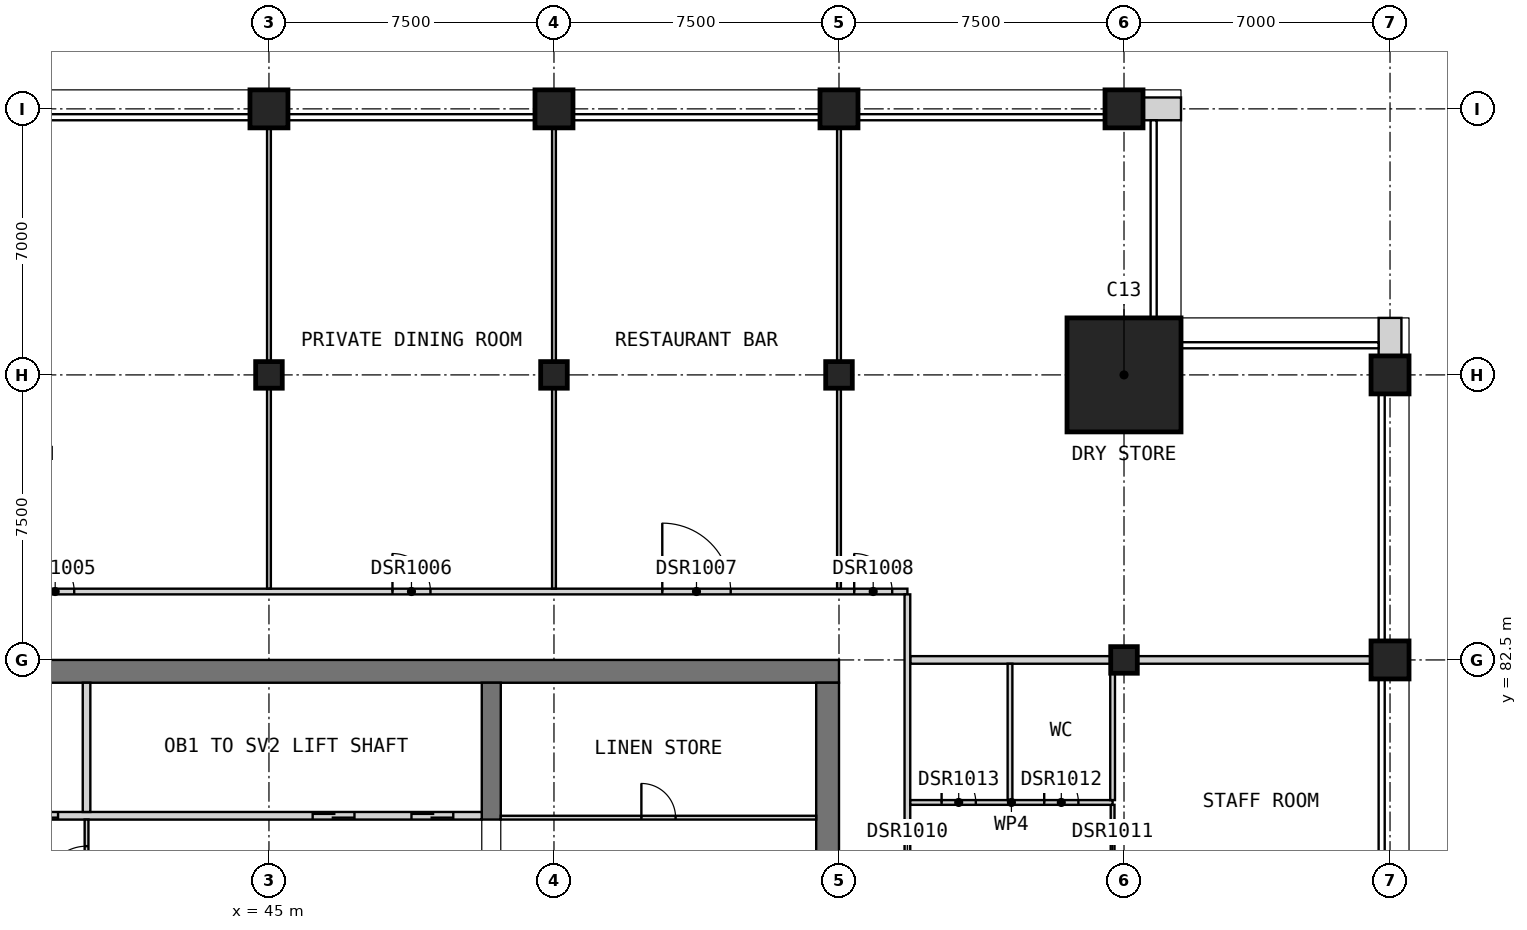
"""IFC4 building model, lengths in metres.
Left out: names, types, materials, properties, quantities, classifications, styles, units other than length and angle.
Written with IfcOpenShell. Run it as: python <this file> out.ifc"""

import sys

from ifc_helpers import new_model, si_unit, direction, frame, frame_2d, origin, origin_2d, place, context, subcontext, project, spatial, rectangle, extrude, element, fill, save


model = new_model("IFC4")
c1 = context("Model", 3, precision=1e-05, world=origin(), true_north=direction((0.0, 1.0)))
c2 = subcontext(c1, "Body", "Model", "MODEL_VIEW")
j1 = project(units=[si_unit("LENGTHUNIT", "METRE"), si_unit("PLANEANGLEUNIT", "RADIAN")], contexts=[c1])
p1 = place(None, origin())
s1 = spatial("IfcSite", under=j1, at=p1, CompositionType="ELEMENT")
p2 = place(p1, origin())
s2 = spatial("IfcBuilding", under=s1, at=p2, CompositionType="ELEMENT")
p3 = place(p2, frame((0.0, 0.0, 292.2)))
s3 = spatial("IfcBuildingStorey", under=s2, at=p3, CompositionType="ELEMENT", Elevation=292.2)
p4 = place(p3, frame((45.0, 90.0, 0.0), z_axis=(0.0, 0.0, 1.0), x_axis=(1.0, 0.0, 0.0)))
e1 = element("IfcColumn", 1, at=p4, inside=s3, PredefinedType="COLUMN", context=c2, shape_type="SweptSolid", body=[
    extrude(rectangle(XDim=0.7, YDim=0.7, at=origin_2d()), origin(), (0.0, 0.0, 1.0), 5.5),
])
p5 = place(p3, frame((45.0, 97.0, 0.0), z_axis=(0.0, 0.0, 1.0), x_axis=(1.0, 0.0, 0.0)))
e2 = element("IfcColumn", 2, at=p5, inside=s3, PredefinedType="COLUMN", context=c2, shape_type="SweptSolid", body=[
    extrude(rectangle(XDim=1.0, YDim=1.0, at=origin_2d()), origin(), (0.0, 0.0, 1.0), 5.5),
])
p6 = place(p3, frame((52.5, 90.0, 0.0), z_axis=(0.0, 0.0, 1.0), x_axis=(1.0, 0.0, 0.0)))
e3 = element("IfcColumn", 3, at=p6, inside=s3, PredefinedType="COLUMN", context=c2, shape_type="SweptSolid", body=[
    extrude(rectangle(XDim=0.7, YDim=0.7, at=origin_2d()), origin(), (0.0, 0.0, 1.0), 5.5),
])
p7 = place(p3, frame((52.5, 97.0, 0.0), z_axis=(0.0, 0.0, 1.0), x_axis=(1.0, 0.0, 0.0)))
e4 = element("IfcColumn", 4, at=p7, inside=s3, PredefinedType="COLUMN", context=c2, shape_type="SweptSolid", body=[
    extrude(rectangle(XDim=1.0, YDim=1.0, at=origin_2d()), origin(), (0.0, 0.0, 1.0), 5.5),
])
p8 = place(p3, frame((60.0, 90.0, 0.0), z_axis=(0.0, 0.0, 1.0), x_axis=(1.0, 0.0, 0.0)))
e5 = element("IfcColumn", 5, at=p8, inside=s3, PredefinedType="COLUMN", context=c2, shape_type="SweptSolid", body=[
    extrude(rectangle(XDim=0.7, YDim=0.7, at=origin_2d()), origin(), (0.0, 0.0, 1.0), 5.5),
])
p9 = place(p3, frame((60.0, 97.0, 0.0), z_axis=(0.0, 0.0, 1.0), x_axis=(1.0, 0.0, 0.0)))
e6 = element("IfcColumn", 6, at=p9, inside=s3, PredefinedType="COLUMN", context=c2, shape_type="SweptSolid", body=[
    extrude(rectangle(XDim=1.0, YDim=1.0, at=origin_2d()), origin(), (0.0, 0.0, 1.0), 5.5),
])
p10 = place(p3, frame((67.5, 82.5, 0.0), z_axis=(0.0, 0.0, 1.0), x_axis=(1.0, 0.0, 0.0)))
e7 = element("IfcColumn", 7, at=p10, inside=s3, PredefinedType="COLUMN", context=c2, shape_type="SweptSolid", body=[
    extrude(rectangle(XDim=0.7, YDim=0.7, at=origin_2d()), origin(), (0.0, 0.0, 1.0), 5.5),
])
for number, where, z_axis, x_axis in (
    (8, (67.5, 97.0, 0.0), (0.0, 0.0, 1.0), (1.0, 0.0, 0.0)),
    (9, (74.5, 82.5, 0.0), (0.0, 0.0, 1.0), (1.0, 0.0, 0.0)),
    (10, (74.5, 90.0, 0.0), (0.0, 0.0, 1.0), (1.0, 0.0, 0.0)),
):
    element("IfcColumn", number, at=place(p3, frame(where, z_axis=z_axis, x_axis=x_axis)), inside=s3, PredefinedType="COLUMN", context=c2, shape_type="SweptSolid", body=[
        extrude(rectangle(XDim=1.0, YDim=1.0, at=origin_2d()), origin(), (0.0, 0.0, 1.0), 5.5),
    ])
p11 = place(p3, frame((67.5, 90.0, 0.0), z_axis=(0.0, 0.0, 1.0), x_axis=(1.0, 0.0, 0.0)))
e11 = element("IfcColumn", 11, at=p11, inside=s3, PredefinedType="COLUMN", context=c2, shape_type="SweptSolid", body=[
    extrude(rectangle(XDim=3.0, YDim=3.0, at=origin_2d()), origin(), (0.0, 0.0, 1.0), 5.5),
])
p12 = place(p3, frame((30.0, 82.2, 0.0), z_axis=(0.0, 0.0, 1.0), x_axis=(1.0, 0.0, 0.0)))
e12 = element("IfcWall", 12, at=p12, inside=s3, PredefinedType="SHEAR", context=c2, shape_type="SweptSolid", body=[
    extrude(rectangle(XDim=30.0, YDim=0.6, at=frame_2d((15.0, 0.0))), origin(), (0.0, 0.0, 1.0), 5.5),
])
p13 = place(p3, frame((59.7, 60.6, 0.0), z_axis=(0.0, 0.0, 1.0), x_axis=(0.0, 1.0, 0.0)))
e13 = element("IfcWall", 13, at=p13, inside=s3, PredefinedType="SHEAR", context=c2, shape_type="SweptSolid", body=[
    extrude(rectangle(XDim=21.3, YDim=0.6, at=frame_2d((10.65, 0.0))), origin(), (0.0, 0.0, 1.0), 5.5),
])
p14 = place(p13, frame((14.9, 0.0, 0.0)))
e14 = element("IfcOpeningElement", 14, at=p14, cuts=e13, PredefinedType="OPENING", context=c2, shape_type="SweptSolid", body=[
    extrude(rectangle(XDim=1.8, YDim=2.1, at=frame_2d((0.9, 1.05))), frame((0.0, 0.31, 0.0), z_axis=(0.0, -1.0, 0.0), x_axis=(1.0, 0.0, 0.0)), (0.0, 0.0, 1.0), 0.62),
])
p15 = place(p3, frame((50.85, 78.3, 0.0), z_axis=(0.0, 0.0, 1.0), x_axis=(0.0, 1.0, 0.0)))
e15 = element("IfcWall", 15, at=p15, inside=s3, PredefinedType="SHEAR", context=c2, shape_type="SweptSolid", body=[
    extrude(rectangle(XDim=3.6, YDim=0.5, at=frame_2d((1.8, 0.0))), origin(), (0.0, 0.0, 1.0), 5.5),
])
for number, where, z_axis, x_axis in (
    (16, (74.5, 90.5, 0.0), (0.0, 0.0, 1.0), (0.0, 1.0, 0.0)),
    (17, (69.0, 97.0, 0.0), (0.0, 0.0, 1.0), (-1.0, 0.0, 0.0)),
):
    element("IfcWall", number, at=place(p3, frame(where, z_axis=z_axis, x_axis=x_axis)), inside=s3, PredefinedType="SOLIDWALL", context=c2, shape_type="SweptSolid", body=[
        extrude(rectangle(XDim=1.0, YDim=0.6, at=frame_2d((0.5, 0.0))), origin(), (0.0, 0.0, 1.0), 5.2),
    ])
p16 = place(p3, frame((35.0, 78.4, 0.0), z_axis=(0.0, 0.0, 1.0), x_axis=(1.0, 0.0, 0.0)))
e18 = element("IfcWall", 18, at=p16, inside=s3, PredefinedType="SOLIDWALL", context=c2, shape_type="SweptSolid", body=[
    extrude(rectangle(XDim=15.6, YDim=0.2, at=frame_2d((7.8, 0.0))), origin(), (0.0, 0.0, 1.0), 5.5),
])
p17 = place(p16, frame((0.75, 0.0, 0.0)))
e19 = element("IfcOpeningElement", 19, at=p17, cuts=e18, PredefinedType="OPENING", context=c2, shape_type="SweptSolid", body=[
    extrude(rectangle(XDim=1.1, YDim=2.1, at=frame_2d((0.55, 1.05))), frame((0.0, 0.11, 0.0), z_axis=(0.0, -1.0, 0.0), x_axis=(1.0, 0.0, 0.0)), (0.0, 0.0, 1.0), 0.22),
])
p18 = place(p16, frame((3.35, 0.0, 0.0)))
e20 = element("IfcOpeningElement", 20, at=p18, cuts=e18, PredefinedType="OPENING", context=c2, shape_type="SweptSolid", body=[
    extrude(rectangle(XDim=1.1, YDim=2.1, at=frame_2d((0.55, 1.05))), frame((0.0, 0.11, 0.0), z_axis=(0.0, -1.0, 0.0), x_axis=(1.0, 0.0, 0.0)), (0.0, 0.0, 1.0), 0.22),
])
p19 = place(p16, frame((11.15, 0.0, 0.0)))
e21 = element("IfcOpeningElement", 21, at=p19, cuts=e18, PredefinedType="OPENING", context=c2, shape_type="SweptSolid", body=[
    extrude(rectangle(XDim=1.1, YDim=2.1, at=frame_2d((0.55, 1.05))), frame((0.0, 0.11, 0.0), z_axis=(0.0, -1.0, 0.0), x_axis=(1.0, 0.0, 0.0)), (0.0, 0.0, 1.0), 0.22),
])
p20 = place(p16, frame((13.75, 0.0, 0.0)))
e22 = element("IfcOpeningElement", 22, at=p20, cuts=e18, PredefinedType="OPENING", context=c2, shape_type="SweptSolid", body=[
    extrude(rectangle(XDim=1.1, YDim=2.1, at=frame_2d((0.55, 1.05))), frame((0.0, 0.11, 0.0), z_axis=(0.0, -1.0, 0.0), x_axis=(1.0, 0.0, 0.0)), (0.0, 0.0, 1.0), 0.22),
])
p21 = place(p3, frame((40.2, 78.5, 0.0), z_axis=(0.0, 0.0, 1.0), x_axis=(0.0, 1.0, 0.0)))
e23 = element("IfcWall", 23, at=p21, inside=s3, PredefinedType="SOLIDWALL", context=c2, shape_type="SweptSolid", body=[
    extrude(rectangle(XDim=3.4, YDim=0.2, at=frame_2d((1.7, 0.0))), origin(), (0.0, 0.0, 1.0), 5.5),
])
p22 = place(p3, frame((40.2, 75.3, 0.0), z_axis=(0.0, 0.0, 1.0), x_axis=(0.0, 1.0, 0.0)))
e24 = element("IfcWall", 24, at=p22, inside=s3, PredefinedType="PARTITIONING", context=c2, shape_type="SweptSolid", body=[
    extrude(rectangle(XDim=3.0, YDim=0.1, at=frame_2d((1.5, 0.0))), origin(), (0.0, 0.0, 1.0), 5.2),
])
p23 = place(p22, frame((1.2, 0.0, 0.0)))
e25 = element("IfcOpeningElement", 25, at=p23, cuts=e24, PredefinedType="OPENING", context=c2, shape_type="SweptSolid", body=[
    extrude(rectangle(XDim=1.1, YDim=2.1, at=frame_2d((0.55, 1.05))), frame((0.0, 0.06, 0.0), z_axis=(0.0, -1.0, 0.0), x_axis=(1.0, 0.0, 0.0)), (0.0, 0.0, 1.0), 0.12),
])
p24 = place(p3, frame((51.1, 78.35, 0.0), z_axis=(0.0, 0.0, 1.0), x_axis=(1.0, 0.0, 0.0)))
e26 = element("IfcWall", 26, at=p24, inside=s3, PredefinedType="PARTITIONING", context=c2, shape_type="SweptSolid", body=[
    extrude(rectangle(XDim=8.3, YDim=0.1, at=frame_2d((4.15, 0.0))), origin(), (0.0, 0.0, 1.0), 5.2),
])
p25 = place(p24, frame((3.7, 0.0, 0.0)))
e27 = element("IfcOpeningElement", 27, at=p25, cuts=e26, PredefinedType="OPENING", context=c2, shape_type="SweptSolid", body=[
    extrude(rectangle(XDim=0.9, YDim=2.1, at=frame_2d((0.45, 1.05))), frame((0.0, 0.06, 0.0), z_axis=(0.0, -1.0, 0.0), x_axis=(1.0, 0.0, 0.0)), (0.0, 0.0, 1.0), 0.12),
])
p26 = place(p3, frame((61.875, 82.5, 0.0), z_axis=(0.0, 0.0, 1.0), x_axis=(1.0, 0.0, 0.0)))
e28 = element("IfcWall", 28, at=p26, inside=s3, PredefinedType="PARTITIONING", context=c2, shape_type="SweptSolid", body=[
    extrude(rectangle(XDim=13.125, YDim=0.2, at=frame_2d((6.562, 0.0))), origin(), (0.0, 0.0, 1.0), 5.2),
])
p27 = place(p3, frame((33.75, 84.3, 0.0), z_axis=(0.0, 0.0, 1.0), x_axis=(1.0, 0.0, 0.0)))
e29 = element("IfcWall", 29, at=p27, inside=s3, PredefinedType="PARTITIONING", context=c2, shape_type="SweptSolid", body=[
    extrude(rectangle(XDim=28.05, YDim=0.15, at=frame_2d((14.025, 0.0))), origin(), (0.0, 0.0, 1.0), 5.2),
])
p28 = place(p27, frame((5.125, 0.0, 0.0)))
e30 = element("IfcOpeningElement", 30, at=p28, cuts=e29, PredefinedType="OPENING", context=c2, shape_type="SweptSolid", body=[
    extrude(rectangle(XDim=1.0, YDim=2.1, at=frame_2d((0.5, 1.05))), frame((0.0, 0.085, 0.0), z_axis=(0.0, -1.0, 0.0), x_axis=(1.0, 0.0, 0.0)), (0.0, 0.0, 1.0), 0.17),
])
p29 = place(p27, frame((14.5, 0.0, 0.0)))
e31 = element("IfcOpeningElement", 31, at=p29, cuts=e29, PredefinedType="OPENING", context=c2, shape_type="SweptSolid", body=[
    extrude(rectangle(XDim=1.0, YDim=2.1, at=frame_2d((0.5, 1.05))), frame((0.0, 0.085, 0.0), z_axis=(0.0, -1.0, 0.0), x_axis=(1.0, 0.0, 0.0)), (0.0, 0.0, 1.0), 0.17),
])
p30 = place(p27, frame((21.6, 0.0, 0.0)))
e32 = element("IfcOpeningElement", 32, at=p30, cuts=e29, PredefinedType="OPENING", context=c2, shape_type="SweptSolid", body=[
    extrude(rectangle(XDim=1.8, YDim=2.1, at=frame_2d((0.9, 1.05))), frame((0.0, 0.085, 0.0), z_axis=(0.0, -1.0, 0.0), x_axis=(1.0, 0.0, 0.0)), (0.0, 0.0, 1.0), 0.17),
])
p31 = place(p27, frame((26.65, 0.0, 0.0)))
e33 = element("IfcOpeningElement", 33, at=p31, cuts=e29, PredefinedType="OPENING", context=c2, shape_type="SweptSolid", body=[
    extrude(rectangle(XDim=1.0, YDim=2.1, at=frame_2d((0.5, 1.05))), frame((0.0, 0.085, 0.0), z_axis=(0.0, -1.0, 0.0), x_axis=(1.0, 0.0, 0.0)), (0.0, 0.0, 1.0), 0.17),
])
p32 = place(p3, frame((61.8, 58.275, 0.0), z_axis=(0.0, 0.0, 1.0), x_axis=(0.0, 1.0, 0.0)))
e34 = element("IfcWall", 34, at=p32, inside=s3, PredefinedType="PARTITIONING", context=c2, shape_type="SweptSolid", body=[
    extrude(rectangle(XDim=25.95, YDim=0.15, at=frame_2d((12.975, 0.0))), origin(), (0.0, 0.0, 1.0), 5.2),
])
p33 = place(p32, frame((8.725, 0.0, 0.0)))
e35 = element("IfcOpeningElement", 35, at=p33, cuts=e34, PredefinedType="OPENING", context=c2, shape_type="SweptSolid", body=[
    extrude(rectangle(XDim=1.0, YDim=2.1, at=frame_2d((0.5, 1.05))), frame((0.0, 0.085, 0.0), z_axis=(0.0, -1.0, 0.0), x_axis=(1.0, 0.0, 0.0)), (0.0, 0.0, 1.0), 0.17),
])
p34 = place(p32, frame((18.15, 0.0, 0.0)))
e36 = element("IfcOpeningElement", 36, at=p34, cuts=e34, PredefinedType="OPENING", context=c2, shape_type="SweptSolid", body=[
    extrude(rectangle(XDim=0.9, YDim=2.1, at=frame_2d((0.45, 1.05))), frame((0.0, 0.085, 0.0), z_axis=(0.0, -1.0, 0.0), x_axis=(1.0, 0.0, 0.0)), (0.0, 0.0, 1.0), 0.17),
])
for number, where, z_axis, x_axis in (
    (37, (45.0, 84.375, 0.0), (0.0, 0.0, 1.0), (0.0, 1.0, 0.0)),
    (38, (52.5, 84.375, 0.0), (0.0, 0.0, 1.0), (0.0, 1.0, 0.0)),
    (39, (60.0, 84.375, 0.0), (0.0, 0.0, 1.0), (0.0, 1.0, 0.0)),
):
    element("IfcWall", number, at=place(p3, frame(where, z_axis=z_axis, x_axis=x_axis)), inside=s3, PredefinedType="PARTITIONING", context=c2, shape_type="SweptSolid", body=[
        extrude(rectangle(XDim=13.125, YDim=0.1, at=frame_2d((6.562, 0.0))), origin(), (0.0, 0.0, 1.0), 5.2),
    ])
p35 = place(p3, frame((67.2, 75.1, 0.0), z_axis=(0.0, 0.0, 1.0), x_axis=(0.0, 1.0, 0.0)))
e40 = element("IfcWall", 40, at=p35, inside=s3, PredefinedType="PARTITIONING", context=c2, shape_type="SweptSolid", body=[
    extrude(rectangle(XDim=3.587, YDim=0.1, at=frame_2d((1.794, 0.0))), origin(), (0.0, 0.0, 1.0), 5.2),
])
p36 = place(p35, frame((1.325, 0.0, 0.0)))
e41 = element("IfcOpeningElement", 41, at=p36, cuts=e40, PredefinedType="OPENING", context=c2, shape_type="SweptSolid", body=[
    extrude(rectangle(XDim=0.9, YDim=2.1, at=frame_2d((0.45, 1.05))), frame((0.0, 0.06, 0.0), z_axis=(0.0, -1.0, 0.0), x_axis=(1.0, 0.0, 0.0)), (0.0, 0.0, 1.0), 0.12),
])
p37 = place(p3, frame((61.875, 78.75, 0.0), z_axis=(0.0, 0.0, 1.0), x_axis=(1.0, 0.0, 0.0)))
e42 = element("IfcWall", 42, at=p37, inside=s3, PredefinedType="PARTITIONING", context=c2, shape_type="SweptSolid", body=[
    extrude(rectangle(XDim=5.325, YDim=0.125, at=frame_2d((2.663, 0.0))), origin(), (0.0, 0.0, 1.0), 5.2),
])
p38 = place(p37, frame((3.525, 0.0, 0.0)))
e43 = element("IfcOpeningElement", 43, at=p38, cuts=e42, PredefinedType="OPENING", context=c2, shape_type="SweptSolid", body=[
    extrude(rectangle(XDim=0.9, YDim=2.1, at=frame_2d((0.45, 1.05))), frame((0.0, 0.073, 0.0), z_axis=(0.0, -1.0, 0.0), x_axis=(1.0, 0.0, 0.0)), (0.0, 0.0, 1.0), 0.145),
])
p39 = place(p37, frame((0.825, 0.0, 0.0)))
e44 = element("IfcOpeningElement", 44, at=p39, cuts=e42, PredefinedType="OPENING", context=c2, shape_type="SweptSolid", body=[
    extrude(rectangle(XDim=0.9, YDim=2.1, at=frame_2d((0.45, 1.05))), frame((0.0, 0.073, 0.0), z_axis=(0.0, -1.0, 0.0), x_axis=(1.0, 0.0, 0.0)), (0.0, 0.0, 1.0), 0.145),
])
for number, where, z_axis, x_axis in (
    (45, (64.5, 78.812, 0.0), (0.0, 0.0, 1.0), (0.0, 1.0, 0.0)),
    (46, (67.2, 78.812, 0.0), (0.0, 0.0, 1.0), (0.0, 1.0, 0.0)),
):
    element("IfcWall", number, at=place(p3, frame(where, z_axis=z_axis, x_axis=x_axis)), inside=s3, PredefinedType="PARTITIONING", context=c2, shape_type="SweptSolid", body=[
        extrude(rectangle(XDim=3.587, YDim=0.125, at=frame_2d((1.794, 0.0))), origin(), (0.0, 0.0, 1.0), 5.2),
    ])
p40 = place(p18, origin())
e47 = element("IfcDoor", 47, at=p40, inside=s3, OperationType="DOUBLE_DOOR_SLIDING", PredefinedType="DOOR", context=c2, shape_type="SweptSolid", body=[
    extrude(rectangle(XDim=1.1, YDim=2.1, at=frame_2d((0.55, 1.05))), frame((0.0, 0.025, 0.0), z_axis=(0.0, -1.0, 0.0), x_axis=(1.0, 0.0, 0.0)), (0.0, 0.0, 1.0), 0.05),
])
fill(e20, e47)
p41 = place(p19, origin())
e48 = element("IfcDoor", 48, at=p41, inside=s3, OperationType="DOUBLE_DOOR_SLIDING", PredefinedType="DOOR", context=c2, shape_type="SweptSolid", body=[
    extrude(rectangle(XDim=1.1, YDim=2.1, at=frame_2d((0.55, 1.05))), frame((0.0, 0.025, 0.0), z_axis=(0.0, -1.0, 0.0), x_axis=(1.0, 0.0, 0.0)), (0.0, 0.0, 1.0), 0.05),
])
fill(e21, e48)
p42 = place(p20, origin())
e49 = element("IfcDoor", 49, at=p42, inside=s3, OperationType="DOUBLE_DOOR_SLIDING", PredefinedType="DOOR", context=c2, shape_type="SweptSolid", body=[
    extrude(rectangle(XDim=1.1, YDim=2.1, at=frame_2d((0.55, 1.05))), frame((0.0, 0.025, 0.0), z_axis=(0.0, -1.0, 0.0), x_axis=(1.0, 0.0, 0.0)), (0.0, 0.0, 1.0), 0.05),
])
fill(e22, e49)
p43 = place(p23, origin())
e50 = element("IfcDoor", 50, at=p43, inside=s3, OperationType="SINGLE_SWING_LEFT", PredefinedType="DOOR", context=c2, shape_type="SweptSolid", body=[
    extrude(rectangle(XDim=1.1, YDim=2.1, at=frame_2d((0.55, 1.05))), frame((0.0, 0.025, 0.0), z_axis=(0.0, -1.0, 0.0), x_axis=(1.0, 0.0, 0.0)), (0.0, 0.0, 1.0), 0.05),
])
fill(e25, e50)
p44 = place(p25, origin())
e51 = element("IfcDoor", 51, at=p44, inside=s3, OperationType="SINGLE_SWING_LEFT", PredefinedType="DOOR", context=c2, shape_type="SweptSolid", body=[
    extrude(rectangle(XDim=0.9, YDim=2.1, at=frame_2d((0.45, 1.05))), frame((0.0, 0.025, 0.0), z_axis=(0.0, -1.0, 0.0), x_axis=(1.0, 0.0, 0.0)), (0.0, 0.0, 1.0), 0.05),
])
fill(e27, e51)
p45 = place(p28, origin())
e52 = element("IfcDoor", 52, at=p45, inside=s3, OperationType="SINGLE_SWING_LEFT", PredefinedType="DOOR", context=c2, shape_type="SweptSolid", body=[
    extrude(rectangle(XDim=1.0, YDim=2.1, at=frame_2d((0.5, 1.05))), frame((0.0, 0.025, 0.0), z_axis=(0.0, -1.0, 0.0), x_axis=(1.0, 0.0, 0.0)), (0.0, 0.0, 1.0), 0.05),
])
fill(e30, e52)
p46 = place(p29, origin())
e53 = element("IfcDoor", 53, at=p46, inside=s3, OperationType="SINGLE_SWING_LEFT", PredefinedType="DOOR", context=c2, shape_type="SweptSolid", body=[
    extrude(rectangle(XDim=1.0, YDim=2.1, at=frame_2d((0.5, 1.05))), frame((0.0, 0.025, 0.0), z_axis=(0.0, -1.0, 0.0), x_axis=(1.0, 0.0, 0.0)), (0.0, 0.0, 1.0), 0.05),
])
fill(e31, e53)
p47 = place(p30, origin())
e54 = element("IfcDoor", 54, at=p47, inside=s3, OperationType="DOUBLE_DOOR_SINGLE_SWING", PredefinedType="DOOR", context=c2, shape_type="SweptSolid", body=[
    extrude(rectangle(XDim=1.8, YDim=2.1, at=frame_2d((0.9, 1.05))), frame((0.0, 0.025, 0.0), z_axis=(0.0, -1.0, 0.0), x_axis=(1.0, 0.0, 0.0)), (0.0, 0.0, 1.0), 0.05),
])
fill(e32, e54)
p48 = place(p31, origin())
e55 = element("IfcDoor", 55, at=p48, inside=s3, OperationType="SINGLE_SWING_LEFT", PredefinedType="DOOR", context=c2, shape_type="SweptSolid", body=[
    extrude(rectangle(XDim=1.0, YDim=2.1, at=frame_2d((0.5, 1.05))), frame((0.0, 0.025, 0.0), z_axis=(0.0, -1.0, 0.0), x_axis=(1.0, 0.0, 0.0)), (0.0, 0.0, 1.0), 0.05),
])
fill(e33, e55)
p49 = place(p38, origin())
e56 = element("IfcDoor", 56, at=p49, inside=s3, OperationType="SINGLE_SWING_LEFT", PredefinedType="DOOR", context=c2, shape_type="SweptSolid", body=[
    extrude(rectangle(XDim=0.9, YDim=2.1, at=frame_2d((0.45, 1.05))), frame((0.0, 0.025, 0.0), z_axis=(0.0, -1.0, 0.0), x_axis=(1.0, 0.0, 0.0)), (0.0, 0.0, 1.0), 0.05),
])
fill(e43, e56)
p50 = place(p39, origin())
e57 = element("IfcDoor", 57, at=p50, inside=s3, OperationType="SINGLE_SWING_LEFT", PredefinedType="DOOR", context=c2, shape_type="SweptSolid", body=[
    extrude(rectangle(XDim=0.9, YDim=2.1, at=frame_2d((0.45, 1.05))), frame((0.0, 0.025, 0.0), z_axis=(0.0, -1.0, 0.0), x_axis=(1.0, 0.0, 0.0)), (0.0, 0.0, 1.0), 0.05),
])
fill(e44, e57)
save(model, sys.argv[1])
